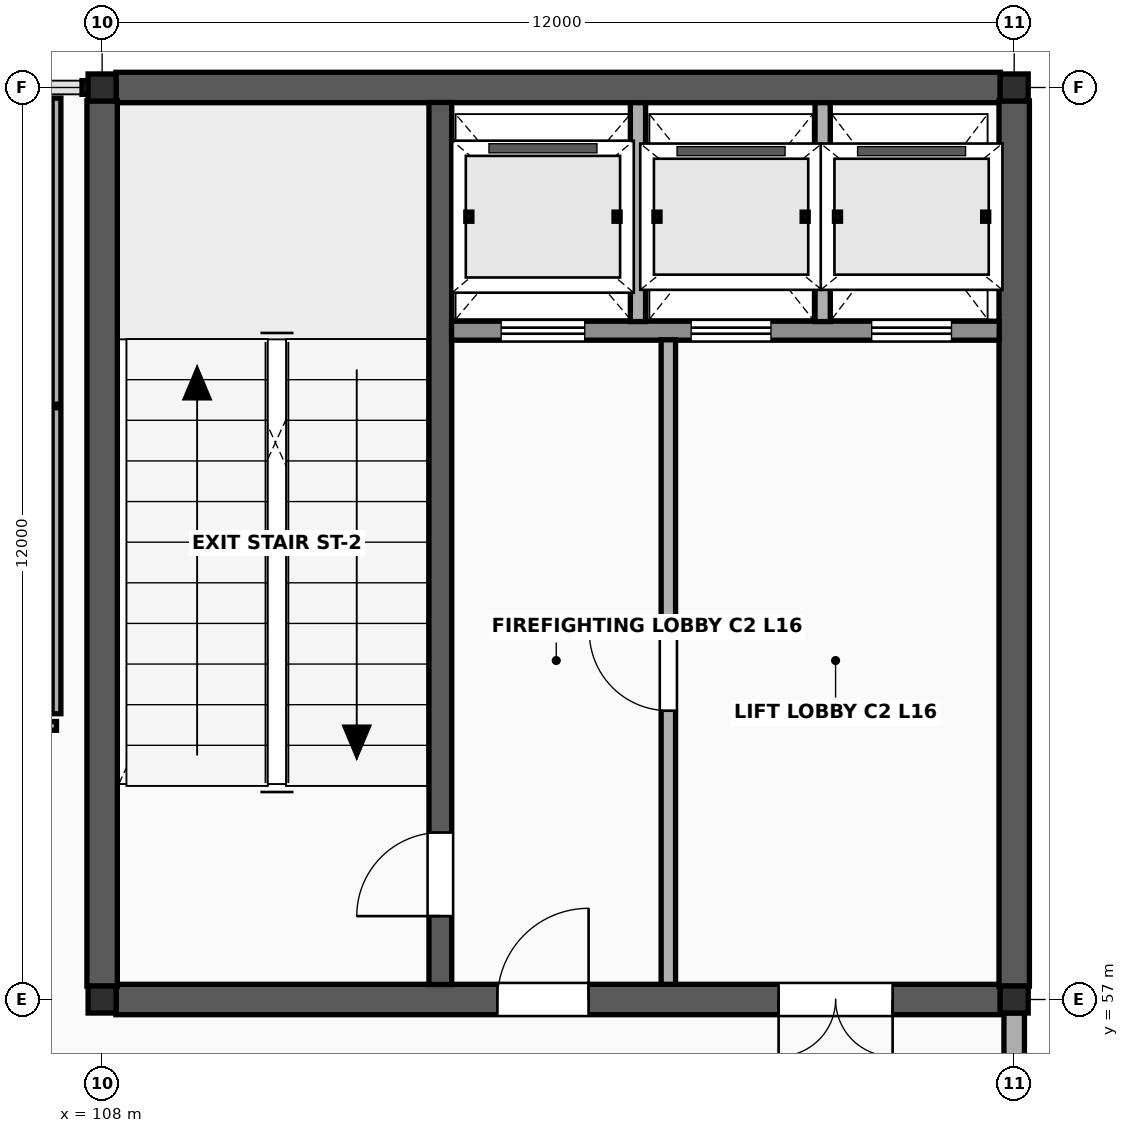
"""IFC4 building model, lengths in metres.
Left out: names, types, materials, properties, quantities, classifications, styles, units other than length and angle.
Written with IfcOpenShell. Run it as: python <this file> out.ifc"""

import sys

from ifc_helpers import new_model, si_unit, direction, frame, frame_2d, origin, origin_2d, place, context, subcontext, project, spatial, rectangle, i_section, extrude, element, fill, save


model = new_model("IFC4")
c1 = context("Model", 3, precision=1e-05, world=origin(), true_north=direction((0.0, 1.0)))
c2 = subcontext(c1, "Body", "Model", "MODEL_VIEW")
j1 = project(units=[si_unit("LENGTHUNIT", "METRE"), si_unit("PLANEANGLEUNIT", "RADIAN")], contexts=[c1])
p1 = place(None, origin())
s1 = spatial("IfcSite", under=j1, at=p1, CompositionType="ELEMENT")
p2 = place(p1, origin())
s2 = spatial("IfcBuilding", under=s1, at=p2, CompositionType="ELEMENT")
p3 = place(p2, frame((0.0, 0.0, 65.6)))
s3 = spatial("IfcBuildingStorey", under=s2, at=p3, CompositionType="ELEMENT", Elevation=65.6)
for number, where, z_axis, x_axis in (
    (1, (108.0, 57.0, 0.0), (0.0, 0.0, 1.0), (1.0, 0.0, 0.0)),
    (2, (108.0, 69.0, 0.0), (0.0, 0.0, 1.0), (1.0, 0.0, 0.0)),
    (3, (120.0, 57.0, 0.0), (0.0, 0.0, 1.0), (1.0, 0.0, 0.0)),
    (4, (120.0, 69.0, 0.0), (0.0, 0.0, 1.0), (1.0, 0.0, 0.0)),
):
    element("IfcColumn", number, at=place(p3, frame(where, z_axis=z_axis, x_axis=x_axis)), inside=s3, PredefinedType="COLUMN", context=c2, shape_type="SweptSolid", body=[
        extrude(i_section(OverallWidth=0.369, OverallDepth=0.356, WebThickness=0.011, FlangeThickness=0.018, FilletRadius=0.018, at=origin_2d()), origin(), (0.0, 0.0, 1.0), 4.0),
    ])
p4 = place(p3, frame((108.181, 57.0, 0.0), z_axis=(0.0, 0.0, 1.0), x_axis=(1.0, 0.0, 0.0)))
e5 = element("IfcWall", 5, at=p4, inside=s3, PredefinedType="SHEAR", context=c2, shape_type="SweptSolid", body=[
    extrude(rectangle(XDim=11.637, YDim=0.4, at=frame_2d((5.819, 0.0))), origin(), (0.0, 0.0, 1.0), 3.793),
])
p5 = place(p4, frame((5.019, 0.0, 0.0)))
e6 = element("IfcOpeningElement", 6, at=p5, cuts=e5, PredefinedType="OPENING", context=c2, shape_type="SweptSolid", body=[
    extrude(rectangle(XDim=1.2, YDim=2.2, at=frame_2d((0.6, 1.1))), frame((0.0, 0.215, 0.0), z_axis=(0.0, -1.0, 0.0), x_axis=(1.0, 0.0, 0.0)), (0.0, 0.0, 1.0), 0.43),
])
p6 = place(p4, frame((8.719, 0.0, 0.0)))
e7 = element("IfcOpeningElement", 7, at=p6, cuts=e5, PredefinedType="OPENING", context=c2, shape_type="SweptSolid", body=[
    extrude(rectangle(XDim=1.5, YDim=2.25, at=frame_2d((0.75, 1.125))), frame((0.0, 0.215, 0.0), z_axis=(0.0, -1.0, 0.0), x_axis=(1.0, 0.0, 0.0)), (0.0, 0.0, 1.0), 0.43),
])
p7 = place(p3, frame((108.181, 69.0, 0.0), z_axis=(0.0, 0.0, 1.0), x_axis=(1.0, 0.0, 0.0)))
e8 = element("IfcWall", 8, at=p7, inside=s3, PredefinedType="SHEAR", context=c2, shape_type="SweptSolid", body=[
    extrude(rectangle(XDim=11.637, YDim=0.4, at=frame_2d((5.819, 0.0))), origin(), (0.0, 0.0, 1.0), 3.793),
])
for number, where, z_axis, x_axis in (
    (9, (108.0, 57.175, 0.0), (0.0, 0.0, 1.0), (0.0, 1.0, 0.0)),
    (10, (120.0, 57.175, 0.0), (0.0, 0.0, 1.0), (0.0, 1.0, 0.0)),
):
    element("IfcWall", number, at=place(p3, frame(where, z_axis=z_axis, x_axis=x_axis)), inside=s3, PredefinedType="SHEAR", context=c2, shape_type="SweptSolid", body=[
        extrude(rectangle(XDim=11.65, YDim=0.4, at=frame_2d((5.825, 0.0))), origin(), (0.0, 0.0, 1.0), 3.793),
    ])
p8 = place(p3, frame((112.45, 57.197, 0.0), z_axis=(0.0, 0.0, 1.0), x_axis=(0.0, 1.0, 0.0)))
e11 = element("IfcWall", 11, at=p8, inside=s3, PredefinedType="SHEAR", context=c2, shape_type="SweptSolid", body=[
    extrude(rectangle(XDim=11.606, YDim=0.3, at=frame_2d((5.803, 0.0))), origin(), (0.0, 0.0, 1.0), 3.793),
])
p9 = place(p8, frame((0.9, 0.0, 0.0)))
e12 = element("IfcOpeningElement", 12, at=p9, cuts=e11, PredefinedType="OPENING", context=c2, shape_type="SweptSolid", body=[
    extrude(rectangle(XDim=1.1, YDim=2.2, at=frame_2d((0.55, 1.1))), frame((0.0, 0.165, 0.0), z_axis=(0.0, -1.0, 0.0), x_axis=(1.0, 0.0, 0.0)), (0.0, 0.0, 1.0), 0.33),
])
p10 = place(p3, frame((112.597, 65.8, 0.0), z_axis=(0.0, 0.0, 1.0), x_axis=(1.0, 0.0, 0.0)))
e13 = element("IfcWall", 13, at=p10, inside=s3, PredefinedType="SOLIDWALL", context=c2, shape_type="SweptSolid", body=[
    extrude(rectangle(XDim=7.206, YDim=0.25, at=frame_2d((3.603, 0.0))), origin(), (0.0, 0.0, 1.0), 3.793),
])
p11 = place(p10, frame((0.653, 0.0, 0.0)))
e14 = element("IfcOpeningElement", 14, at=p11, cuts=e13, PredefinedType="OPENING", context=c2, shape_type="SweptSolid", body=[
    extrude(rectangle(XDim=1.1, YDim=2.24, at=frame_2d((0.55, 1.12))), frame((0.0, 0.14, 0.0), z_axis=(0.0, -1.0, 0.0), x_axis=(1.0, 0.0, 0.0)), (0.0, 0.0, 1.0), 0.28),
])
p12 = place(p10, frame((3.153, 0.0, 0.0)))
e15 = element("IfcOpeningElement", 15, at=p12, cuts=e13, PredefinedType="OPENING", context=c2, shape_type="SweptSolid", body=[
    extrude(rectangle(XDim=1.05, YDim=2.2, at=frame_2d((0.525, 1.1))), frame((0.0, 0.14, 0.0), z_axis=(0.0, -1.0, 0.0), x_axis=(1.0, 0.0, 0.0)), (0.0, 0.0, 1.0), 0.28),
])
p13 = place(p10, frame((5.528, 0.0, 0.0)))
e16 = element("IfcOpeningElement", 16, at=p13, cuts=e13, PredefinedType="OPENING", context=c2, shape_type="SweptSolid", body=[
    extrude(rectangle(XDim=1.05, YDim=2.2, at=frame_2d((0.525, 1.1))), frame((0.0, 0.14, 0.0), z_axis=(0.0, -1.0, 0.0), x_axis=(1.0, 0.0, 0.0)), (0.0, 0.0, 1.0), 0.28),
])
for number, where, z_axis, x_axis in (
    (17, (115.05, 65.92, 0.0), (0.0, 0.0, 1.0), (0.0, 1.0, 0.0)),
    (18, (117.48, 65.92, 0.0), (0.0, 0.0, 1.0), (0.0, 1.0, 0.0)),
):
    element("IfcWall", number, at=place(p3, frame(where, z_axis=z_axis, x_axis=x_axis)), inside=s3, PredefinedType="SOLIDWALL", context=c2, shape_type="SweptSolid", body=[
        extrude(rectangle(XDim=2.88, YDim=0.2, at=frame_2d((1.44, 0.0))), origin(), (0.0, 0.0, 1.0), 3.783),
    ])
p14 = place(p3, frame((115.45, 57.2, 0.0), z_axis=(0.0, 0.0, 1.0), x_axis=(0.0, 1.0, 0.0)))
e19 = element("IfcWall", 19, at=p14, inside=s3, PredefinedType="SOLIDWALL", context=c2, shape_type="SweptSolid", body=[
    extrude(rectangle(XDim=8.48, YDim=0.19, at=frame_2d((4.24, 0.0))), origin(), (0.0, 0.0, 1.0), 3.783),
])
p15 = place(p14, frame((3.6, 0.0, 0.0)))
e20 = element("IfcOpeningElement", 20, at=p15, cuts=e19, PredefinedType="OPENING", context=c2, shape_type="SweptSolid", body=[
    extrude(rectangle(XDim=1.04, YDim=2.18, at=frame_2d((0.52, 1.09))), frame((0.0, 0.11, 0.0), z_axis=(0.0, -1.0, 0.0), x_axis=(1.0, 0.0, 0.0)), (0.0, 0.0, 1.0), 0.22),
])
p16 = place(p3, frame((120.0, 45.176, 0.0), z_axis=(0.0, 0.0, 1.0), x_axis=(0.0, 1.0, 0.0)))
e21 = element("IfcWall", 21, at=p16, inside=s3, PredefinedType="SOLIDWALL", context=c2, shape_type="SweptSolid", body=[
    extrude(rectangle(XDim=11.648, YDim=0.27, at=frame_2d((5.824, 0.0))), origin(), (0.0, 0.0, 1.0), 3.246),
])
p17 = place(p16, frame((4.699, 0.0, 1.4)))
e22 = element("IfcOpeningElement", 22, at=p17, cuts=e21, PredefinedType="OPENING", context=c2, shape_type="SweptSolid", body=[
    extrude(rectangle(XDim=2.25, YDim=0.88, at=frame_2d((1.125, 0.44))), frame((0.0, 0.15, 0.0), z_axis=(0.0, -1.0, 0.0), x_axis=(1.0, 0.0, 0.0)), (0.0, 0.0, 1.0), 0.3),
])
p18 = place(p3, frame((72.6, 60.6, 0.0), z_axis=(0.0, 0.0, 1.0), x_axis=(1.0, 0.0, 0.0)))
e23 = element("IfcWall", 23, at=p18, inside=s3, PredefinedType="PARTITIONING", context=c2, shape_type="SweptSolid", body=[
    extrude(rectangle(XDim=34.8, YDim=0.115, at=frame_2d((17.4, 0.0))), origin(), (0.0, 0.0, 1.0), 2.88),
])
p19 = place(p18, frame((16.395, 0.0, 0.0)))
e24 = element("IfcOpeningElement", 24, at=p19, cuts=e23, PredefinedType="OPENING", context=c2, shape_type="SweptSolid", body=[
    extrude(rectangle(XDim=2.01, YDim=2.45, at=frame_2d((1.005, 1.225))), frame((0.0, 0.073, 0.0), z_axis=(0.0, -1.0, 0.0), x_axis=(1.0, 0.0, 0.0)), (0.0, 0.0, 1.0), 0.145),
])
p20 = place(p3, frame((107.4, 60.76, 0.0), z_axis=(0.0, 0.0, 1.0), x_axis=(0.0, 1.0, 0.0)))
e25 = element("IfcWall", 25, at=p20, inside=s3, PredefinedType="PARTITIONING", context=c2, shape_type="SweptSolid", body=[
    extrude(rectangle(XDim=8.1, YDim=0.115, at=frame_2d((4.05, 0.0))), origin(), (0.0, 0.0, 1.0), 2.88),
])
p21 = place(p9, origin())
e26 = element("IfcDoor", 26, at=p21, inside=s3, OperationType="SINGLE_SWING_LEFT", PredefinedType="DOOR", context=c2, shape_type="SweptSolid", body=[
    extrude(rectangle(XDim=1.1, YDim=2.2, at=frame_2d((0.55, 1.1))), frame((0.0, 0.025, 0.0), z_axis=(0.0, -1.0, 0.0), x_axis=(1.0, 0.0, 0.0)), (0.0, 0.0, 1.0), 0.05),
])
fill(e12, e26)
p22 = place(p15, origin())
e27 = element("IfcDoor", 27, at=p22, inside=s3, OperationType="SINGLE_SWING_RIGHT", PredefinedType="DOOR", context=c2, shape_type="SweptSolid", body=[
    extrude(rectangle(XDim=1.04, YDim=2.18, at=frame_2d((0.52, 1.09))), frame((0.0, 0.025, 0.0), z_axis=(0.0, -1.0, 0.0), x_axis=(1.0, 0.0, 0.0)), (0.0, 0.0, 1.0), 0.05),
])
fill(e20, e27)
p23 = place(p5, origin())
e28 = element("IfcDoor", 28, at=p23, inside=s3, OperationType="SINGLE_SWING_RIGHT", PredefinedType="DOOR", context=c2, shape_type="SweptSolid", body=[
    extrude(rectangle(XDim=1.2, YDim=2.2, at=frame_2d((0.6, 1.1))), frame((0.0, 0.025, 0.0), z_axis=(0.0, -1.0, 0.0), x_axis=(1.0, 0.0, 0.0)), (0.0, 0.0, 1.0), 0.05),
])
fill(e6, e28)
p24 = place(p6, origin())
e29 = element("IfcDoor", 29, at=p24, inside=s3, OperationType="DOUBLE_DOOR_SINGLE_SWING", PredefinedType="DOOR", context=c2, shape_type="SweptSolid", body=[
    extrude(rectangle(XDim=1.5, YDim=2.25, at=frame_2d((0.75, 1.125))), frame((0.0, 0.025, 0.0), z_axis=(0.0, -1.0, 0.0), x_axis=(1.0, 0.0, 0.0)), (0.0, 0.0, 1.0), 0.05),
])
fill(e7, e29)
p25 = place(p11, origin())
e30 = element("IfcDoor", 30, at=p25, inside=s3, OperationType="SLIDING_TO_LEFT", PredefinedType="USERDEFINED", context=c2, shape_type="SweptSolid", body=[
    extrude(rectangle(XDim=1.1, YDim=2.24, at=frame_2d((0.55, 1.12))), frame((0.0, 0.025, 0.0), z_axis=(0.0, -1.0, 0.0), x_axis=(1.0, 0.0, 0.0)), (0.0, 0.0, 1.0), 0.05),
])
fill(e14, e30)
p26 = place(p12, origin())
e31 = element("IfcDoor", 31, at=p26, inside=s3, OperationType="SLIDING_TO_LEFT", PredefinedType="USERDEFINED", context=c2, shape_type="SweptSolid", body=[
    extrude(rectangle(XDim=1.05, YDim=2.2, at=frame_2d((0.525, 1.1))), frame((0.0, 0.025, 0.0), z_axis=(0.0, -1.0, 0.0), x_axis=(1.0, 0.0, 0.0)), (0.0, 0.0, 1.0), 0.05),
])
fill(e15, e31)
p27 = place(p13, origin())
e32 = element("IfcDoor", 32, at=p27, inside=s3, OperationType="SLIDING_TO_LEFT", PredefinedType="USERDEFINED", context=c2, shape_type="SweptSolid", body=[
    extrude(rectangle(XDim=1.05, YDim=2.2, at=frame_2d((0.525, 1.1))), frame((0.0, 0.025, 0.0), z_axis=(0.0, -1.0, 0.0), x_axis=(1.0, 0.0, 0.0)), (0.0, 0.0, 1.0), 0.05),
])
fill(e16, e32)
save(model, sys.argv[1])
